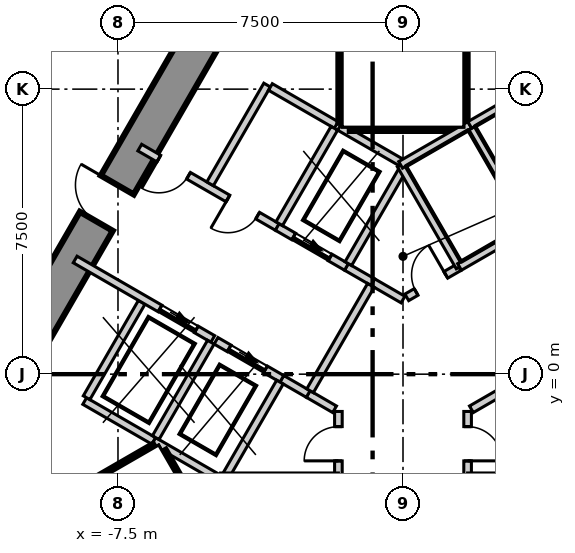
"""IFC4 building model, lengths in metres.
Left out: names, types, materials, properties, quantities, classifications, styles, units other than length and angle.
Written with IfcOpenShell. Run it as: python <this file> out.ifc"""

import sys

from ifc_helpers import new_model, si_unit, direction, frame, frame_2d, origin, place, context, subcontext, project, spatial, polyline, rectangle, outline, extrude, element, fill, save


model = new_model("IFC4")
c1 = context("Model", 3, precision=1e-05, world=origin(), true_north=direction((0.0, 1.0)))
c2 = subcontext(c1, "Body", "Model", "MODEL_VIEW")
j1 = project(units=[si_unit("LENGTHUNIT", "METRE"), si_unit("PLANEANGLEUNIT", "RADIAN")], contexts=[c1])
p1 = place(None, origin())
s1 = spatial("IfcSite", under=j1, at=p1, CompositionType="ELEMENT")
p2 = place(p1, origin())
s2 = spatial("IfcBuilding", under=s1, at=p2, CompositionType="ELEMENT")
p3 = place(p2, frame((0.0, 0.0, -5.5)))
s3 = spatial("IfcBuildingStorey", under=s2, at=p3, CompositionType="ELEMENT", Elevation=-5.5)
p4 = place(p3, frame((-3.507, 38.325, -0.4), z_axis=(0.0, 0.0, 1.0), x_axis=(-0.500003790369, -0.866023215403, 0.0)))
e1 = element("IfcWall", 1, at=p4, inside=s3, PredefinedType="SOLIDWALL", context=c2, shape_type="SweptSolid", body=[
    extrude(rectangle(XDim=62.874, YDim=0.6, at=frame_2d((31.437, 0.0))), origin(), (0.0, 0.0, 1.0), 5.5),
])
p5 = place(p3, frame((-1.617, 15.2, -0.4), z_axis=(0.0, 0.0, 1.0), x_axis=(-0.499992141631, -0.866029940768, 0.0)))
e2 = element("IfcWall", 2, at=p5, inside=s3, PredefinedType="SHEAR", context=c2, shape_type="SweptSolid", body=[
    extrude(outline(polyline([(-0.289, -0.499), (1.656, -0.499), (3.601, -0.499), (5.547, -0.499), (7.492, -0.499), (9.437, -0.5), (11.382, -0.5), (13.328, -0.5), (15.273, -0.5), (17.218, -0.5), (19.163, -0.5), (21.109, -0.5), (23.054, -0.5), (24.999, -0.5), (24.422, 0.5), (22.566, 0.5), (20.709, 0.5), (18.853, 0.5), (16.997, 0.5), (15.14, 0.5), (13.284, 0.5), (11.427, 0.5), (9.571, 0.5), (7.715, 0.5), (5.858, 0.5), (4.002, 0.5), (2.146, 0.5), (0.289, 0.5), (-0.289, -0.499)])), origin(), (0.0, 0.0, 1.0), 5.5),
])
p6 = place(p5, frame((11.805, 0.0, 0.4)))
e3 = element("IfcOpeningElement", 3, at=p6, cuts=e2, PredefinedType="OPENING", context=c2, shape_type="SweptSolid", body=[
    extrude(rectangle(XDim=1.1, YDim=2.1, at=frame_2d((0.55, 1.05))), frame((0.0, 0.51, 0.0), z_axis=(0.0, -1.0, 0.0), x_axis=(1.0, 0.0, 0.0)), (0.0, 0.0, 1.0), 1.02),
])
p7 = place(p3, frame((13.972, -6.2, -0.4), z_axis=(0.0, 0.0, 1.0), x_axis=(-0.499992141631, 0.866029940768, 0.0)))
e4 = element("IfcWall", 4, at=p7, inside=s3, PredefinedType="SHEAR", context=c2, shape_type="SweptSolid", body=[
    extrude(outline(polyline([(-0.288, -0.5), (1.657, -0.5), (3.602, -0.5), (5.547, -0.5), (7.493, -0.5), (9.438, -0.5), (11.383, -0.5), (13.328, -0.5), (15.273, -0.5), (17.218, -0.499), (19.164, -0.499), (21.109, -0.499), (23.054, -0.499), (24.999, -0.499), (24.422, 0.5), (22.566, 0.5), (20.709, 0.5), (18.853, 0.5), (16.996, 0.5), (15.14, 0.5), (13.283, 0.5), (11.427, 0.5), (9.57, 0.5), (7.714, 0.5), (5.857, 0.5), (4.001, 0.5), (2.145, 0.5), (0.288, 0.5), (-0.288, -0.5)])), origin(), (0.0, 0.0, 1.0), 5.5),
])
p8 = place(p3, frame((-8.376, -0.707, 0.0), z_axis=(0.0, 0.0, 1.0), x_axis=(0.866067520717, -0.499927044236, 0.0)))
e5 = element("IfcWall", 5, at=p8, inside=s3, PredefinedType="SOLIDWALL", context=c2, shape_type="SweptSolid", body=[
    extrude(rectangle(XDim=2.1, YDim=0.2, at=frame_2d((1.05, 0.0))), origin(), (0.0, 0.0, 1.0), 5.1),
])
p9 = place(p3, frame((-8.326, -0.62, 0.0), z_axis=(0.0, 0.0, 1.0), x_axis=(0.500023687443, 0.866011727401, 0.0)))
e6 = element("IfcWall", 6, at=p9, inside=s3, PredefinedType="SOLIDWALL", context=c2, shape_type="SweptSolid", body=[
    extrude(rectangle(XDim=2.9, YDim=0.2, at=frame_2d((1.45, 0.0))), origin(), (0.0, 0.0, 1.0), 5.1),
])
p10 = place(p3, frame((-1.7, -2.682, 0.0), z_axis=(0.0, 0.0, 1.0), x_axis=(0.0, 1.0, 0.0)))
e7 = element("IfcWall", 7, at=p10, inside=s3, PredefinedType="SOLIDWALL", context=c2, shape_type="SweptSolid", body=[
    extrude(rectangle(XDim=1.701, YDim=0.2, at=frame_2d((0.851, 0.0))), origin(), (0.0, 0.0, 1.0), 5.1),
])
p11 = place(p10, frame((0.401, 0.0, 0.0)))
e8 = element("IfcOpeningElement", 8, at=p11, cuts=e7, PredefinedType="OPENING", context=c2, shape_type="SweptSolid", body=[
    extrude(rectangle(XDim=0.9, YDim=2.1, at=frame_2d((0.45, 1.05))), frame((0.0, 0.11, 0.0), z_axis=(0.0, -1.0, 0.0), x_axis=(1.0, 0.0, 0.0)), (0.0, 0.0, 1.0), 0.22),
])
p12 = place(p3, frame((-2.495, -0.522, 0.0), z_axis=(0.0, 0.0, 1.0), x_axis=(0.86559276406, -0.500748606395, 0.0)))
e9 = element("IfcWall", 9, at=p12, inside=s3, PredefinedType="SOLIDWALL", context=c2, shape_type="SweptSolid", body=[
    extrude(rectangle(XDim=0.803, YDim=0.2, at=frame_2d((0.401, 0.0))), origin(), (0.0, 0.0, 1.0), 5.1),
])
p13 = place(p3, frame((-0.795, 2.422, 0.0), z_axis=(0.0, 0.0, 1.0), x_axis=(0.865893231143, -0.500228859883, 0.0)))
e10 = element("IfcWall", 10, at=p13, inside=s3, PredefinedType="SOLIDWALL", context=c2, shape_type="SweptSolid", body=[
    extrude(rectangle(XDim=0.918, YDim=0.2, at=frame_2d((0.459, 0.0))), origin(), (0.0, 0.0, 1.0), 5.1),
])
p14 = place(p3, frame((0.1, 2.021, 0.0), z_axis=(0.0, 0.0, 1.0), x_axis=(0.866188150584, 0.499718008269, 0.0)))
e11 = element("IfcWall", 11, at=p14, inside=s3, PredefinedType="SOLIDWALL", context=c2, shape_type="SweptSolid", body=[
    extrude(rectangle(XDim=1.585, YDim=0.2, at=frame_2d((0.792, 0.0))), origin(), (0.0, 0.0, 1.0), 5.1),
])
p15 = place(p14, frame((0.284, 0.0, 0.0)))
e12 = element("IfcOpeningElement", 12, at=p15, cuts=e11, PredefinedType="OPENING", context=c2, shape_type="SweptSolid", body=[
    extrude(rectangle(XDim=0.9, YDim=2.1, at=frame_2d((0.45, 1.05))), frame((0.0, 0.11, 0.0), z_axis=(0.0, -1.0, 0.0), x_axis=(1.0, 0.0, 0.0)), (0.0, 0.0, 1.0), 0.22),
])
p16 = place(p3, frame((1.7, -2.682, 0.0), z_axis=(0.0, 0.0, 1.0), x_axis=(0.0, 1.0, 0.0)))
e13 = element("IfcWall", 13, at=p16, inside=s3, PredefinedType="SOLIDWALL", context=c2, shape_type="SweptSolid", body=[
    extrude(rectangle(XDim=1.701, YDim=0.2, at=frame_2d((0.851, 0.0))), origin(), (0.0, 0.0, 1.0), 5.1),
])
p17 = place(p16, frame((0.401, 0.0, 0.0)))
e14 = element("IfcOpeningElement", 14, at=p17, cuts=e13, PredefinedType="OPENING", context=c2, shape_type="SweptSolid", body=[
    extrude(rectangle(XDim=0.9, YDim=2.1, at=frame_2d((0.45, 1.05))), frame((0.0, 0.11, 0.0), z_axis=(0.0, -1.0, 0.0), x_axis=(1.0, 0.0, 0.0)), (0.0, 0.0, 1.0), 0.22),
])
p18 = place(p3, frame((1.8, -0.924, 0.0), z_axis=(0.0, 0.0, 1.0), x_axis=(0.865959917263, 0.500113408832, 0.0)))
e15 = element("IfcWall", 15, at=p18, inside=s3, PredefinedType="SOLIDWALL", context=c2, shape_type="SweptSolid", body=[
    extrude(rectangle(XDim=1.586, YDim=0.2, at=frame_2d((0.793, 0.0))), origin(), (0.0, 0.0, 1.0), 5.1),
])
p19 = place(p3, frame((-8.627, 3.018, 0.0), z_axis=(0.0, 0.0, 1.0), x_axis=(0.866039775641, -0.499975106388, 0.0)))
e16 = element("IfcWall", 16, at=p19, inside=s3, PredefinedType="SOLIDWALL", context=c2, shape_type="SweptSolid", body=[
    extrude(rectangle(XDim=4.182, YDim=0.2, at=frame_2d((2.091, 0.0))), origin(), (0.0, 0.0, 1.0), 5.1),
])
p20 = place(p19, frame((2.58, 0.0, 0.0)))
e17 = element("IfcOpeningElement", 17, at=p20, cuts=e16, PredefinedType="OPENING", context=c2, shape_type="SweptSolid", body=[
    extrude(rectangle(XDim=1.1, YDim=2.1, at=frame_2d((0.55, 1.05))), frame((0.0, 0.11, 0.0), z_axis=(0.0, -1.0, 0.0), x_axis=(1.0, 0.0, 0.0)), (0.0, 0.0, 1.0), 0.22),
])
p21 = place(p3, frame((-3.19, -0.121, 0.0), z_axis=(0.0, 0.0, 1.0), x_axis=(0.866175452185, -0.499740018442, 0.0)))
e18 = element("IfcWall", 18, at=p21, inside=s3, PredefinedType="SOLIDWALL", context=c2, shape_type="SweptSolid", body=[
    extrude(rectangle(XDim=0.802, YDim=0.2, at=frame_2d((0.401, 0.0))), origin(), (0.0, 0.0, 1.0), 5.1),
])
p22 = place(p3, frame((-6.927, 5.962, 0.0), z_axis=(0.0, 0.0, 1.0), x_axis=(0.866065051207, -0.49993132236, 0.0)))
e19 = element("IfcWall", 19, at=p22, inside=s3, PredefinedType="SOLIDWALL", context=c2, shape_type="SweptSolid", body=[
    extrude(rectangle(XDim=4.182, YDim=0.2, at=frame_2d((2.091, 0.0))), origin(), (0.0, 0.0, 1.0), 5.1),
])
p23 = place(p22, frame((2.68, 0.0, 0.0)))
e20 = element("IfcOpeningElement", 20, at=p23, cuts=e19, PredefinedType="OPENING", context=c2, shape_type="SweptSolid", body=[
    extrude(rectangle(XDim=0.9, YDim=2.1, at=frame_2d((0.45, 1.05))), frame((0.0, 0.11, 0.0), z_axis=(0.0, -1.0, 0.0), x_axis=(1.0, 0.0, 0.0)), (0.0, 0.0, 1.0), 0.22),
])
p24 = place(p22, frame((0.58, 0.0, 0.0)))
e21 = element("IfcOpeningElement", 21, at=p24, cuts=e19, PredefinedType="OPENING", context=c2, shape_type="SweptSolid", body=[
    extrude(rectangle(XDim=0.9, YDim=2.1, at=frame_2d((0.45, 1.05))), frame((0.0, 0.11, 0.0), z_axis=(0.0, -1.0, 0.0), x_axis=(1.0, 0.0, 0.0)), (0.0, 0.0, 1.0), 0.22),
])
p25 = place(p3, frame((-1.49, 2.823, 0.0), z_axis=(0.0, 0.0, 1.0), x_axis=(0.866251430126, -0.499608306381, 0.0)))
e22 = element("IfcWall", 22, at=p25, inside=s3, PredefinedType="SOLIDWALL", context=c2, shape_type="SweptSolid", body=[
    extrude(rectangle(XDim=0.802, YDim=0.2, at=frame_2d((0.401, 0.0))), origin(), (0.0, 0.0, 1.0), 5.1),
])
p26 = place(p3, frame((-5.076, 5.009, 0.0), z_axis=(0.0, 0.0, 1.0), x_axis=(0.50002537861, 0.866010750942, 0.0)))
e23 = element("IfcWall", 23, at=p26, inside=s3, PredefinedType="SOLIDWALL", context=c2, shape_type="SweptSolid", body=[
    extrude(rectangle(XDim=3.0, YDim=0.2, at=frame_2d((1.5, 0.0))), origin(), (0.0, 0.0, 1.0), 5.1),
])
p27 = place(p3, frame((-3.489, 7.557, 0.0), z_axis=(0.0, 0.0, 1.0), x_axis=(0.866010750942, -0.50002537861, 0.0)))
e24 = element("IfcWall", 24, at=p27, inside=s3, PredefinedType="SOLIDWALL", context=c2, shape_type="SweptSolid", body=[
    extrude(rectangle(XDim=2.0, YDim=0.2, at=frame_2d((1.0, 0.0))), origin(), (0.0, 0.0, 1.0), 5.1),
])
p28 = place(p3, frame((-2.445, -0.436, 0.0), z_axis=(0.0, 0.0, 1.0), x_axis=(0.499929347863, 0.866066190972, 0.0)))
e25 = element("IfcWall", 25, at=p28, inside=s3, PredefinedType="SOLIDWALL", context=c2, shape_type="SweptSolid", body=[
    extrude(rectangle(XDim=3.201, YDim=0.2, at=frame_2d((1.6, 0.0))), origin(), (0.0, 0.0, 1.0), 5.1),
])
p29 = place(p3, frame((-6.557, -1.757, 0.0), z_axis=(0.0, 0.0, 1.0), x_axis=(0.866019539041, -0.500010157896, 0.0)))
e26 = element("IfcWall", 26, at=p29, inside=s3, PredefinedType="SOLIDWALL", context=c2, shape_type="SweptSolid", body=[
    extrude(rectangle(XDim=2.008, YDim=0.2, at=frame_2d((1.004, 0.0))), origin(), (0.0, 0.0, 1.0), 5.1),
])
p30 = place(p3, frame((-6.507, -1.67, 0.0), z_axis=(0.0, 0.0, 1.0), x_axis=(0.50012328804, 0.865954211699, 0.0)))
e27 = element("IfcWall", 27, at=p30, inside=s3, PredefinedType="SOLIDWALL", context=c2, shape_type="SweptSolid", body=[
    extrude(rectangle(XDim=2.9, YDim=0.2, at=frame_2d((1.45, 0.0))), origin(), (0.0, 0.0, 1.0), 5.1),
])
p31 = place(p3, frame((-4.92, 0.878, 0.0), z_axis=(0.0, 0.0, 1.0), x_axis=(0.866010750942, -0.50002537861, 0.0)))
e28 = element("IfcWall", 28, at=p31, inside=s3, PredefinedType="SOLIDWALL", context=c2, shape_type="SweptSolid", body=[
    extrude(rectangle(XDim=2.0, YDim=0.2, at=frame_2d((1.0, 0.0))), origin(), (0.0, 0.0, 1.0), 5.1),
])
p32 = place(p31, frame((0.4, 0.0, 0.0)))
e29 = element("IfcOpeningElement", 29, at=p32, cuts=e28, PredefinedType="OPENING", context=c2, shape_type="SweptSolid", body=[
    extrude(rectangle(XDim=1.1, YDim=2.1, at=frame_2d((0.55, 1.05))), frame((0.0, 0.11, 0.0), z_axis=(0.0, -1.0, 0.0), x_axis=(1.0, 0.0, 0.0)), (0.0, 0.0, 1.0), 0.22),
])
p33 = place(p3, frame((-4.666, -2.682, 0.0), z_axis=(0.0, 0.0, 1.0), x_axis=(0.500065346707, 0.865987672558, 0.0)))
e30 = element("IfcWall", 30, at=p33, inside=s3, PredefinedType="SOLIDWALL", context=c2, shape_type="SweptSolid", body=[
    extrude(rectangle(XDim=2.855, YDim=0.2, at=frame_2d((1.428, 0.0))), origin(), (0.0, 0.0, 1.0), 5.1),
])
p34 = place(p3, frame((-3.309, 3.873, 0.0), z_axis=(0.0, 0.0, 1.0), x_axis=(0.866098583652, -0.499873227325, 0.0)))
e31 = element("IfcWall", 31, at=p34, inside=s3, PredefinedType="SOLIDWALL", context=c2, shape_type="SweptSolid", body=[
    extrude(rectangle(XDim=2.103, YDim=0.2, at=frame_2d((1.051, 0.0))), origin(), (0.0, 0.0, 1.0), 5.1),
])
p35 = place(p34, frame((0.502, 0.0, 0.0)))
e32 = element("IfcOpeningElement", 32, at=p35, cuts=e31, PredefinedType="OPENING", context=c2, shape_type="SweptSolid", body=[
    extrude(rectangle(XDim=1.1, YDim=2.1, at=frame_2d((0.55, 1.05))), frame((0.0, 0.11, 0.0), z_axis=(0.0, -1.0, 0.0), x_axis=(1.0, 0.0, 0.0)), (0.0, 0.0, 1.0), 0.22),
])
p36 = place(p3, frame((-3.257, 3.959, 0.0), z_axis=(0.0, 0.0, 1.0), x_axis=(0.50012328804, 0.865954211699, 0.0)))
e33 = element("IfcWall", 33, at=p36, inside=s3, PredefinedType="SOLIDWALL", context=c2, shape_type="SweptSolid", body=[
    extrude(rectangle(XDim=2.9, YDim=0.2, at=frame_2d((1.45, 0.0))), origin(), (0.0, 0.0, 1.0), 5.1),
])
p37 = place(p3, frame((-1.67, 6.507, 0.0), z_axis=(0.0, 0.0, 1.0), x_axis=(0.865934055563, -0.500158186394, 0.0)))
e34 = element("IfcWall", 34, at=p37, inside=s3, PredefinedType="SOLIDWALL", context=c2, shape_type="SweptSolid", body=[
    extrude(rectangle(XDim=1.908, YDim=0.2, at=frame_2d((0.954, 0.0))), origin(), (0.0, 0.0, 1.0), 5.1),
])
p38 = place(p3, frame((-1.438, 2.909, 0.0), z_axis=(0.0, 0.0, 1.0), x_axis=(0.49977180025, 0.86615711489, 0.0)))
e35 = element("IfcWall", 35, at=p38, inside=s3, PredefinedType="SOLIDWALL", context=c2, shape_type="SweptSolid", body=[
    extrude(rectangle(XDim=2.855, YDim=0.2, at=frame_2d((1.428, 0.0))), origin(), (0.0, 0.0, 1.0), 5.1),
])
p39 = place(p3, frame((-13.946, -6.204, 0.0), z_axis=(0.0, 0.0, 1.0), x_axis=(0.866036527536, 0.499980732602, 0.0)))
e36 = element("IfcWall", 36, at=p39, inside=s3, PredefinedType="SOLIDWALL", context=c2, shape_type="SweptSolid", body=[
    extrude(rectangle(XDim=8.564, YDim=0.2, at=frame_2d((4.282, 0.0))), origin(), (0.0, 0.0, 1.0), 5.1),
])
p40 = place(p3, frame((-6.329, -2.038, 0.0), z_axis=(0.0, 0.0, 1.0), x_axis=(0.50002537861, -0.866010750942, 0.0)))
e37 = element("IfcWall", 37, at=p40, inside=s3, PredefinedType="SOLIDWALL", context=c2, shape_type="SweptSolid", body=[
    extrude(rectangle(XDim=3.0, YDim=0.2, at=frame_2d((1.5, 0.0))), origin(), (0.0, 0.0, 1.0), 5.1),
])
p41 = place(p3, frame((1.6, 6.5, 0.0), z_axis=(0.0, 0.0, 1.0), x_axis=(0.0, 1.0, 0.0)))
e38 = element("IfcWall", 38, at=p41, inside=s3, PredefinedType="SOLIDWALL", context=c2, shape_type="SweptSolid", body=[
    extrude(rectangle(XDim=8.68, YDim=0.2, at=frame_2d((4.34, 0.0))), origin(), (0.0, 0.0, 1.0), 5.1),
])
p42 = place(p3, frame((-1.4, 6.5, 0.0), z_axis=(0.0, 0.0, 1.0), x_axis=(1.0, 0.0, 0.0)))
e39 = element("IfcWall", 39, at=p42, inside=s3, PredefinedType="SOLIDWALL", context=c2, shape_type="SweptSolid", body=[
    extrude(rectangle(XDim=2.9, YDim=0.2, at=frame_2d((1.45, 0.0))), origin(), (0.0, 0.0, 1.0), 5.1),
])
p43 = place(p3, frame((-1.6, 6.615, 0.0), z_axis=(0.0, 0.0, 1.0), x_axis=(0.0, 1.0, 0.0)))
e40 = element("IfcWall", 40, at=p43, inside=s3, PredefinedType="SOLIDWALL", context=c2, shape_type="SweptSolid", body=[
    extrude(rectangle(XDim=8.565, YDim=0.2, at=frame_2d((4.282, 0.0))), origin(), (0.0, 0.0, 1.0), 5.1),
])
p44 = place(p3, frame((4.8, -2.7, 3.9), z_axis=(0.0, 0.0, 1.0), x_axis=(-1.0, 0.0, 0.0)))
e41 = element("IfcWall", 41, at=p44, inside=s3, PredefinedType="SOLIDWALL", context=c2, shape_type="SweptSolid", body=[
    extrude(outline(polyline([(-0.1, -0.1), (0.1, 0.1), (1.55, 0.1), (3.0, 0.1), (3.2, -0.1), (1.55, -0.1), (-0.1, -0.1)])), origin(), (0.0, 0.0, 1.0), 1.2),
])
p45 = place(p3, frame((1.7, -2.7, 3.9), z_axis=(0.0, 0.0, 1.0), x_axis=(0.0, -1.0, 0.0)))
e42 = element("IfcWall", 42, at=p45, inside=s3, PredefinedType="SOLIDWALL", context=c2, shape_type="SweptSolid", body=[
    extrude(outline(polyline([(2.0, 0.1), (2.2, -0.1), (1.05, -0.1), (-0.099, -0.1), (0.1, 0.1), (0.1, 0.1), (0.1, 0.1), (0.1, 0.1), (0.1, 0.1), (0.1, 0.1), (0.1, 0.1), (0.1, 0.1), (0.101, 0.1), (2.0, 0.1)])), origin(), (0.0, 0.0, 1.0), 1.2),
])
p46 = place(p3, frame((-4.8, -2.7, 3.9), z_axis=(0.0, 0.0, 1.0), x_axis=(0.0, -1.0, 0.0)))
e43 = element("IfcWall", 43, at=p46, inside=s3, PredefinedType="SOLIDWALL", context=c2, shape_type="SweptSolid", body=[
    extrude(outline(polyline([(0.1, 0.1), (2.0, 0.1), (2.2, -0.1), (1.05, -0.1), (-0.1, -0.1), (0.1, 0.1)])), origin(), (0.0, 0.0, 1.0), 1.2),
])
p47 = place(p3, frame((-1.7, -4.8, 3.9), z_axis=(0.0, 0.0, 1.0), x_axis=(0.0, 1.0, 0.0)))
e44 = element("IfcWall", 44, at=p47, inside=s3, PredefinedType="SOLIDWALL", context=c2, shape_type="SweptSolid", body=[
    extrude(outline(polyline([(2.0, 0.1), (2.2, -0.1), (1.05, -0.1), (-0.099, -0.1), (0.1, 0.1), (0.1, 0.1), (0.1, 0.1), (0.1, 0.1), (0.1, 0.1), (0.1, 0.1), (0.1, 0.1), (0.1, 0.1), (0.1, 0.1), (2.0, 0.1)])), origin(), (0.0, 0.0, 1.0), 1.2),
])
p48 = place(p3, frame((-1.7, -2.7, 3.9), z_axis=(0.0, 0.0, 1.0), x_axis=(-1.0, 0.0, 0.0)))
e45 = element("IfcWall", 45, at=p48, inside=s3, PredefinedType="SOLIDWALL", context=c2, shape_type="SweptSolid", body=[
    extrude(outline(polyline([(3.0, 0.1), (3.0, 0.1), (3.0, 0.1), (3.0, 0.1), (3.0, 0.1), (3.0, 0.1), (3.0, 0.1), (3.0, 0.1), (3.0, 0.1), (3.199, -0.1), (1.55, -0.1), (-0.099, -0.1), (0.1, 0.1), (0.1, 0.1), (0.1, 0.1), (0.1, 0.1), (0.1, 0.1), (0.1, 0.1), (0.1, 0.1), (0.1, 0.1), (0.101, 0.1), (1.551, 0.1), (3.0, 0.1)])), origin(), (0.0, 0.0, 1.0), 1.2),
])
p49 = place(p3, frame((-0.062, 5.507, 3.9), z_axis=(0.0, 0.0, 1.0), x_axis=(0.499958760481, -0.866049212123, 0.0)))
e46 = element("IfcWall", 46, at=p49, inside=s3, PredefinedType="SOLIDWALL", context=c2, shape_type="SweptSolid", body=[
    extrude(outline(polyline([(0.1, 0.1), (1.55, 0.1), (3.0, 0.1), (3.2, -0.1), (1.55, -0.1), (-0.1, -0.1), (0.1, 0.1)])), origin(), (0.0, 0.0, 1.0), 1.2),
])
p50 = place(p3, frame((1.488, 2.822, 3.9), z_axis=(0.0, 0.0, 1.0), x_axis=(0.866038466041, 0.499977374825, 0.0)))
e47 = element("IfcWall", 47, at=p50, inside=s3, PredefinedType="SOLIDWALL", context=c2, shape_type="SweptSolid", body=[
    extrude(outline(polyline([(2.0, 0.1), (2.2, -0.1), (1.05, -0.1), (-0.099, -0.1), (0.1, 0.1), (0.1, 0.1), (0.1, 0.1), (0.1, 0.1), (0.1, 0.1), (0.1, 0.1), (0.1, 0.1), (0.1, 0.1), (0.1, 0.1), (2.0, 0.1)])), origin(), (0.0, 0.0, 1.0), 1.2),
])
p51 = place(p3, frame((3.307, 3.872, 3.9), z_axis=(0.0, 0.0, 1.0), x_axis=(-0.499933790963, 0.866063626216, 0.0)))
e48 = element("IfcWall", 48, at=p51, inside=s3, PredefinedType="SOLIDWALL", context=c2, shape_type="SweptSolid", body=[
    extrude(outline(polyline([(3.0, 0.1), (3.2, -0.1), (1.55, -0.1), (-0.099, -0.1), (0.1, 0.1), (0.1, 0.1), (0.1, 0.1), (0.1, 0.1), (0.1, 0.1), (0.1, 0.1), (0.1, 0.1), (0.101, 0.1), (0.101, 0.1), (0.101, 0.1), (1.551, 0.1), (3.0, 0.1)])), origin(), (0.0, 0.0, 1.0), 1.2),
])
p52 = place(p3, frame((1.757, 6.557, 3.9), z_axis=(0.0, 0.0, 1.0), x_axis=(-0.866117845619, -0.499839851853, 0.0)))
e49 = element("IfcWall", 49, at=p52, inside=s3, PredefinedType="SOLIDWALL", context=c2, shape_type="SweptSolid", body=[
    extrude(outline(polyline([(2.0, 0.1), (2.0, 0.1), (2.0, 0.1), (2.0, 0.1), (2.0, 0.1), (2.0, 0.1), (2.0, 0.1), (2.0, 0.1), (2.0, 0.1), (2.0, 0.1), (2.2, -0.1), (1.05, -0.1), (-0.099, -0.1), (0.1, 0.1), (0.1, 0.1), (0.1, 0.1), (0.1, 0.1), (0.1, 0.1), (0.1, 0.1), (0.1, 0.1), (0.1, 0.1), (0.1, 0.1), (2.0, 0.1)])), origin(), (0.0, 0.0, 1.0), 1.2),
])
p53 = place(p3, frame((3.576, 7.607, 3.9), z_axis=(0.0, 0.0, 1.0), x_axis=(-0.866038466041, -0.499977374825, 0.0)))
e50 = element("IfcWall", 50, at=p53, inside=s3, PredefinedType="SOLIDWALL", context=c2, shape_type="SweptSolid", body=[
    extrude(outline(polyline([(2.0, 0.1), (2.0, 0.1), (2.0, 0.1), (2.0, -0.1), (0.95, -0.1), (-0.099, -0.1), (0.1, 0.1), (0.1, 0.1), (0.1, 0.1), (0.1, 0.1), (0.1, 0.1), (0.1, 0.1), (0.1, 0.1), (0.1, 0.1), (0.1, 0.1), (2.0, 0.1)])), origin(), (0.0, 0.0, 1.0), 1.2),
])
p54 = place(p32, origin())
e51 = element("IfcDoor", 51, at=p54, inside=s3, OperationType="SLIDING_TO_LEFT", PredefinedType="DOOR", context=c2, shape_type="SweptSolid", body=[
    extrude(rectangle(XDim=1.1, YDim=2.1, at=frame_2d((0.55, 1.05))), frame((0.0, 0.025, 0.0), z_axis=(0.0, -1.0, 0.0), x_axis=(1.0, 0.0, 0.0)), (0.0, 0.0, 1.0), 0.05),
])
fill(e29, e51)
p55 = place(p35, origin())
e52 = element("IfcDoor", 52, at=p55, inside=s3, OperationType="SLIDING_TO_LEFT", PredefinedType="DOOR", context=c2, shape_type="SweptSolid", body=[
    extrude(rectangle(XDim=1.1, YDim=2.1, at=frame_2d((0.55, 1.05))), frame((0.0, 0.025, 0.0), z_axis=(0.0, -1.0, 0.0), x_axis=(1.0, 0.0, 0.0)), (0.0, 0.0, 1.0), 0.05),
])
fill(e32, e52)
p56 = place(p20, origin())
e53 = element("IfcDoor", 53, at=p56, inside=s3, OperationType="SLIDING_TO_LEFT", PredefinedType="DOOR", context=c2, shape_type="SweptSolid", body=[
    extrude(rectangle(XDim=1.1, YDim=2.1, at=frame_2d((0.55, 1.05))), frame((0.0, 0.025, 0.0), z_axis=(0.0, -1.0, 0.0), x_axis=(1.0, 0.0, 0.0)), (0.0, 0.0, 1.0), 0.05),
])
fill(e17, e53)
p57 = place(p23, origin())
e54 = element("IfcDoor", 54, at=p57, inside=s3, OperationType="SINGLE_SWING_LEFT", PredefinedType="DOOR", context=c2, shape_type="SweptSolid", body=[
    extrude(rectangle(XDim=0.9, YDim=2.1, at=frame_2d((0.45, 1.05))), frame((0.0, 0.025, 0.0), z_axis=(0.0, -1.0, 0.0), x_axis=(1.0, 0.0, 0.0)), (0.0, 0.0, 1.0), 0.05),
])
fill(e20, e54)
p58 = place(p6, origin())
e55 = element("IfcDoor", 55, at=p58, inside=s3, OperationType="SINGLE_SWING_LEFT", PredefinedType="DOOR", context=c2, shape_type="SweptSolid", body=[
    extrude(rectangle(XDim=1.1, YDim=2.1, at=frame_2d((0.55, 1.05))), frame((0.0, 0.025, 0.0), z_axis=(0.0, -1.0, 0.0), x_axis=(1.0, 0.0, 0.0)), (0.0, 0.0, 1.0), 0.05),
])
fill(e3, e55)
p59 = place(p11, origin())
e56 = element("IfcDoor", 56, at=p59, inside=s3, OperationType="SINGLE_SWING_RIGHT", PredefinedType="DOOR", context=c2, shape_type="SweptSolid", body=[
    extrude(rectangle(XDim=0.9, YDim=2.1, at=frame_2d((0.45, 1.05))), frame((0.0, 0.025, 0.0), z_axis=(0.0, -1.0, 0.0), x_axis=(1.0, 0.0, 0.0)), (0.0, 0.0, 1.0), 0.05),
])
fill(e8, e56)
p60 = place(p15, origin())
e57 = element("IfcDoor", 57, at=p60, inside=s3, OperationType="SINGLE_SWING_LEFT", PredefinedType="DOOR", context=c2, shape_type="SweptSolid", body=[
    extrude(rectangle(XDim=0.9, YDim=2.1, at=frame_2d((0.45, 1.05))), frame((0.0, 0.025, 0.0), z_axis=(0.0, -1.0, 0.0), x_axis=(1.0, 0.0, 0.0)), (0.0, 0.0, 1.0), 0.05),
])
fill(e12, e57)
p61 = place(p24, origin())
e58 = element("IfcDoor", 58, at=p61, inside=s3, OperationType="SINGLE_SWING_LEFT", PredefinedType="DOOR", context=c2, shape_type="SweptSolid", body=[
    extrude(rectangle(XDim=0.9, YDim=2.1, at=frame_2d((0.45, 1.05))), frame((0.0, 0.025, 0.0), z_axis=(0.0, -1.0, 0.0), x_axis=(1.0, 0.0, 0.0)), (0.0, 0.0, 1.0), 0.05),
])
fill(e21, e58)
p62 = place(p17, origin())
e59 = element("IfcDoor", 59, at=p62, inside=s3, OperationType="SINGLE_SWING_LEFT", PredefinedType="DOOR", context=c2, shape_type="SweptSolid", body=[
    extrude(rectangle(XDim=0.9, YDim=2.1, at=frame_2d((0.45, 1.05))), frame((0.0, 0.025, 0.0), z_axis=(0.0, -1.0, 0.0), x_axis=(1.0, 0.0, 0.0)), (0.0, 0.0, 1.0), 0.05),
])
fill(e14, e59)
save(model, sys.argv[1])
